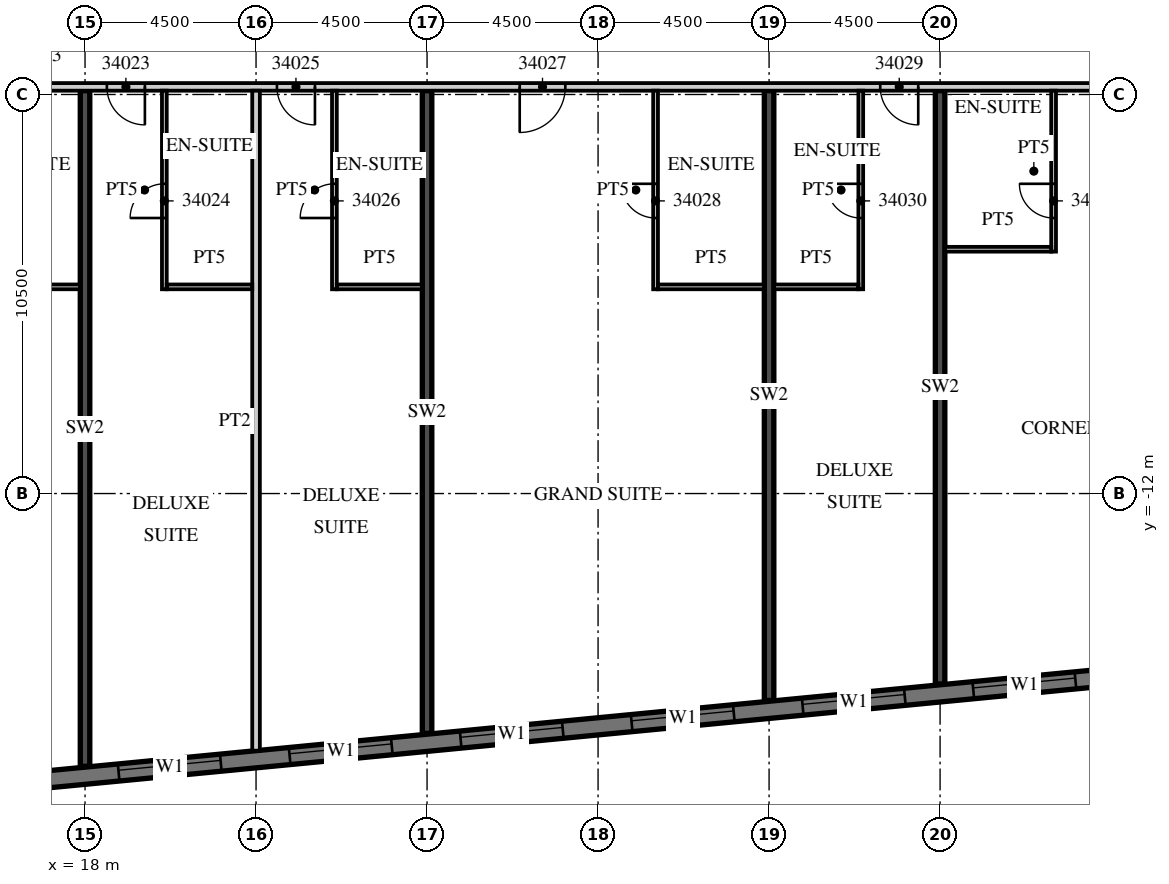
"""IFC4 building model, lengths in metres.
Left out: names, types, materials, properties, quantities, classifications, styles, units other than length and angle.
Written with IfcOpenShell. Run it as: python <this file> out.ifc"""

import sys

from ifc_helpers import new_model, si_unit, direction, frame, frame_2d, origin, place, context, subcontext, project, spatial, rectangle, extrude, element, fill, save


model = new_model("IFC4")
c1 = context("Model", 3, precision=1e-05, world=origin(), true_north=direction((0.0, 1.0)))
c2 = subcontext(c1, "Body", "Model", "MODEL_VIEW")
j1 = project(units=[si_unit("LENGTHUNIT", "METRE"), si_unit("PLANEANGLEUNIT", "RADIAN")], contexts=[c1])
p1 = place(None, origin())
s1 = spatial("IfcSite", under=j1, at=p1, CompositionType="ELEMENT")
p2 = place(p1, origin())
s2 = spatial("IfcBuilding", under=s1, at=p2, CompositionType="ELEMENT")
p3 = place(p2, frame((0.0, 0.0, 147.1)))
s3 = spatial("IfcBuildingStorey", under=s2, at=p3, CompositionType="ELEMENT", Elevation=147.1)
p4 = place(p3, frame((18.0, -19.177, 0.0), z_axis=(0.0, 0.0, 1.0), x_axis=(0.0, 1.0, 0.0)))
e1 = element("IfcWall", 1, at=p4, inside=s3, PredefinedType="SHEAR", context=c2, shape_type="SweptSolid", body=[
    extrude(rectangle(XDim=17.777, YDim=0.25, at=frame_2d((8.889, 0.0))), origin(), (0.0, 0.0, 1.0), 3.0),
])
p5 = place(p3, frame((27.0, -18.311, 0.0), z_axis=(0.0, 0.0, 1.0), x_axis=(0.0, 1.0, 0.0)))
e2 = element("IfcWall", 2, at=p5, inside=s3, PredefinedType="SHEAR", context=c2, shape_type="SweptSolid", body=[
    extrude(rectangle(XDim=16.911, YDim=0.25, at=frame_2d((8.455, 0.0))), origin(), (0.0, 0.0, 1.0), 3.0),
])
p6 = place(p3, frame((36.0, -17.444, 0.0), z_axis=(0.0, 0.0, 1.0), x_axis=(0.0, 1.0, 0.0)))
e3 = element("IfcWall", 3, at=p6, inside=s3, PredefinedType="SHEAR", context=c2, shape_type="SweptSolid", body=[
    extrude(rectangle(XDim=16.044, YDim=0.25, at=frame_2d((8.022, 0.0))), origin(), (0.0, 0.0, 1.0), 3.0),
])
p7 = place(p3, frame((40.5, -17.011, 0.0), z_axis=(0.0, 0.0, 1.0), x_axis=(0.0, 1.0, 0.0)))
e4 = element("IfcWall", 4, at=p7, inside=s3, PredefinedType="SHEAR", context=c2, shape_type="SweptSolid", body=[
    extrude(rectangle(XDim=15.611, YDim=0.25, at=frame_2d((7.805, 0.0))), origin(), (0.0, 0.0, 1.0), 3.0),
])
p8 = place(p3, frame((-13.521, -22.46, 0.0), z_axis=(0.0, 0.0, 1.0), x_axis=(0.995396096335, 0.095846812164, 0.0)))
e5 = element("IfcWall", 5, at=p8, inside=s3, PredefinedType="SOLIDWALL", context=c2, shape_type="SweptSolid", body=[
    extrude(rectangle(XDim=59.151, YDim=0.45, at=frame_2d((29.575, 0.0))), origin(), (0.0, 0.0, 1.0), 3.0),
])
p9 = place(p8, frame((0.91, 0.0, 0.45)))
e6 = element("IfcOpeningElement", 6, at=p9, cuts=e5, PredefinedType="OPENING", context=c2, shape_type="SweptSolid", body=[
    extrude(rectangle(XDim=2.7, YDim=2.25, at=frame_2d((1.35, 1.125))), frame((0.0, 0.235, 0.0), z_axis=(0.0, -1.0, 0.0), x_axis=(1.0, 0.0, 0.0)), (0.0, 0.0, 1.0), 0.47),
])
p10 = place(p8, frame((5.431, 0.0, 0.45)))
e7 = element("IfcOpeningElement", 7, at=p10, cuts=e5, PredefinedType="OPENING", context=c2, shape_type="SweptSolid", body=[
    extrude(rectangle(XDim=2.7, YDim=2.25, at=frame_2d((1.35, 1.125))), frame((0.0, 0.235, 0.0), z_axis=(0.0, -1.0, 0.0), x_axis=(1.0, 0.0, 0.0)), (0.0, 0.0, 1.0), 0.47),
])
p11 = place(p8, frame((9.952, 0.0, 0.45)))
e8 = element("IfcOpeningElement", 8, at=p11, cuts=e5, PredefinedType="OPENING", context=c2, shape_type="SweptSolid", body=[
    extrude(rectangle(XDim=2.7, YDim=2.25, at=frame_2d((1.35, 1.125))), frame((0.0, 0.235, 0.0), z_axis=(0.0, -1.0, 0.0), x_axis=(1.0, 0.0, 0.0)), (0.0, 0.0, 1.0), 0.47),
])
p12 = place(p8, frame((14.473, 0.0, 0.45)))
e9 = element("IfcOpeningElement", 9, at=p12, cuts=e5, PredefinedType="OPENING", context=c2, shape_type="SweptSolid", body=[
    extrude(rectangle(XDim=2.7, YDim=2.25, at=frame_2d((1.35, 1.125))), frame((0.0, 0.235, 0.0), z_axis=(0.0, -1.0, 0.0), x_axis=(1.0, 0.0, 0.0)), (0.0, 0.0, 1.0), 0.47),
])
p13 = place(p8, frame((18.994, 0.0, 0.45)))
e10 = element("IfcOpeningElement", 10, at=p13, cuts=e5, PredefinedType="OPENING", context=c2, shape_type="SweptSolid", body=[
    extrude(rectangle(XDim=2.7, YDim=2.25, at=frame_2d((1.35, 1.125))), frame((0.0, 0.235, 0.0), z_axis=(0.0, -1.0, 0.0), x_axis=(1.0, 0.0, 0.0)), (0.0, 0.0, 1.0), 0.47),
])
p14 = place(p8, frame((23.514, 0.0, 0.45)))
e11 = element("IfcOpeningElement", 11, at=p14, cuts=e5, PredefinedType="OPENING", context=c2, shape_type="SweptSolid", body=[
    extrude(rectangle(XDim=2.7, YDim=2.25, at=frame_2d((1.35, 1.125))), frame((0.0, 0.235, 0.0), z_axis=(0.0, -1.0, 0.0), x_axis=(1.0, 0.0, 0.0)), (0.0, 0.0, 1.0), 0.47),
])
p15 = place(p8, frame((28.035, 0.0, 0.45)))
e12 = element("IfcOpeningElement", 12, at=p15, cuts=e5, PredefinedType="OPENING", context=c2, shape_type="SweptSolid", body=[
    extrude(rectangle(XDim=2.7, YDim=2.25, at=frame_2d((1.35, 1.125))), frame((0.0, 0.235, 0.0), z_axis=(0.0, -1.0, 0.0), x_axis=(1.0, 0.0, 0.0)), (0.0, 0.0, 1.0), 0.47),
])
p16 = place(p8, frame((32.556, 0.0, 0.45)))
e13 = element("IfcOpeningElement", 13, at=p16, cuts=e5, PredefinedType="OPENING", context=c2, shape_type="SweptSolid", body=[
    extrude(rectangle(XDim=2.7, YDim=2.25, at=frame_2d((1.35, 1.125))), frame((0.0, 0.235, 0.0), z_axis=(0.0, -1.0, 0.0), x_axis=(1.0, 0.0, 0.0)), (0.0, 0.0, 1.0), 0.47),
])
p17 = place(p8, frame((37.077, 0.0, 0.45)))
e14 = element("IfcOpeningElement", 14, at=p17, cuts=e5, PredefinedType="OPENING", context=c2, shape_type="SweptSolid", body=[
    extrude(rectangle(XDim=2.7, YDim=2.25, at=frame_2d((1.35, 1.125))), frame((0.0, 0.235, 0.0), z_axis=(0.0, -1.0, 0.0), x_axis=(1.0, 0.0, 0.0)), (0.0, 0.0, 1.0), 0.47),
])
p18 = place(p8, frame((41.598, 0.0, 0.45)))
e15 = element("IfcOpeningElement", 15, at=p18, cuts=e5, PredefinedType="OPENING", context=c2, shape_type="SweptSolid", body=[
    extrude(rectangle(XDim=2.7, YDim=2.25, at=frame_2d((1.35, 1.125))), frame((0.0, 0.235, 0.0), z_axis=(0.0, -1.0, 0.0), x_axis=(1.0, 0.0, 0.0)), (0.0, 0.0, 1.0), 0.47),
])
p19 = place(p8, frame((46.118, 0.0, 0.45)))
e16 = element("IfcOpeningElement", 16, at=p19, cuts=e5, PredefinedType="OPENING", context=c2, shape_type="SweptSolid", body=[
    extrude(rectangle(XDim=2.7, YDim=2.25, at=frame_2d((1.35, 1.125))), frame((0.0, 0.235, 0.0), z_axis=(0.0, -1.0, 0.0), x_axis=(1.0, 0.0, 0.0)), (0.0, 0.0, 1.0), 0.47),
])
p20 = place(p8, frame((50.639, 0.0, 0.45)))
e17 = element("IfcOpeningElement", 17, at=p20, cuts=e5, PredefinedType="OPENING", context=c2, shape_type="SweptSolid", body=[
    extrude(rectangle(XDim=2.7, YDim=2.25, at=frame_2d((1.35, 1.125))), frame((0.0, 0.235, 0.0), z_axis=(0.0, -1.0, 0.0), x_axis=(1.0, 0.0, 0.0)), (0.0, 0.0, 1.0), 0.47),
])
p21 = place(p8, frame((55.15, 0.0, 0.45)))
e18 = element("IfcOpeningElement", 18, at=p21, cuts=e5, PredefinedType="OPENING", context=c2, shape_type="SweptSolid", body=[
    extrude(rectangle(XDim=2.7, YDim=2.25, at=frame_2d((1.35, 1.125))), frame((0.0, 0.235, 0.0), z_axis=(0.0, -1.0, 0.0), x_axis=(1.0, 0.0, 0.0)), (0.0, 0.0, 1.0), 0.47),
])
p22 = place(p3, frame((-13.5, -1.3, 0.0), z_axis=(0.0, 0.0, 1.0), x_axis=(1.0, 0.0, 0.0)))
e19 = element("IfcWall", 19, at=p22, inside=s3, PredefinedType="PARTITIONING", context=c2, shape_type="SweptSolid", body=[
    extrude(rectangle(XDim=60.932, YDim=0.2, at=frame_2d((30.466, 0.0))), origin(), (0.0, 0.0, 1.0), 3.0),
])
p23 = place(p22, frame((2.925, 0.0, 0.0)))
e20 = element("IfcOpeningElement", 20, at=p23, cuts=e19, PredefinedType="OPENING", context=c2, shape_type="SweptSolid", body=[
    extrude(rectangle(XDim=1.0, YDim=2.1, at=frame_2d((0.5, 1.05))), frame((0.0, 0.11, 0.0), z_axis=(0.0, -1.0, 0.0), x_axis=(1.0, 0.0, 0.0)), (0.0, 0.0, 1.0), 0.22),
])
p24 = place(p22, frame((6.938, 0.0, 0.0)))
e21 = element("IfcOpeningElement", 21, at=p24, cuts=e19, PredefinedType="OPENING", context=c2, shape_type="SweptSolid", body=[
    extrude(rectangle(XDim=1.2, YDim=2.1, at=frame_2d((0.6, 1.05))), frame((0.0, 0.11, 0.0), z_axis=(0.0, -1.0, 0.0), x_axis=(1.0, 0.0, 0.0)), (0.0, 0.0, 1.0), 0.22),
])
p25 = place(p22, frame((15.938, 0.0, 0.0)))
e22 = element("IfcOpeningElement", 22, at=p25, cuts=e19, PredefinedType="OPENING", context=c2, shape_type="SweptSolid", body=[
    extrude(rectangle(XDim=1.2, YDim=2.1, at=frame_2d((0.6, 1.05))), frame((0.0, 0.11, 0.0), z_axis=(0.0, -1.0, 0.0), x_axis=(1.0, 0.0, 0.0)), (0.0, 0.0, 1.0), 0.22),
])
p26 = place(p22, frame((24.938, 0.0, 0.0)))
e23 = element("IfcOpeningElement", 23, at=p26, cuts=e19, PredefinedType="OPENING", context=c2, shape_type="SweptSolid", body=[
    extrude(rectangle(XDim=1.2, YDim=2.1, at=frame_2d((0.6, 1.05))), frame((0.0, 0.11, 0.0), z_axis=(0.0, -1.0, 0.0), x_axis=(1.0, 0.0, 0.0)), (0.0, 0.0, 1.0), 0.22),
])
p27 = place(p22, frame((32.075, 0.0, 0.0)))
e24 = element("IfcOpeningElement", 24, at=p27, cuts=e19, PredefinedType="OPENING", context=c2, shape_type="SweptSolid", body=[
    extrude(rectangle(XDim=1.0, YDim=2.1, at=frame_2d((0.5, 1.05))), frame((0.0, 0.11, 0.0), z_axis=(0.0, -1.0, 0.0), x_axis=(1.0, 0.0, 0.0)), (0.0, 0.0, 1.0), 0.22),
])
p28 = place(p22, frame((36.55, 0.0, 0.0)))
e25 = element("IfcOpeningElement", 25, at=p28, cuts=e19, PredefinedType="OPENING", context=c2, shape_type="SweptSolid", body=[
    extrude(rectangle(XDim=1.0, YDim=2.1, at=frame_2d((0.5, 1.05))), frame((0.0, 0.11, 0.0), z_axis=(0.0, -1.0, 0.0), x_axis=(1.0, 0.0, 0.0)), (0.0, 0.0, 1.0), 0.22),
])
p29 = place(p22, frame((42.938, 0.0, 0.0)))
e26 = element("IfcOpeningElement", 26, at=p29, cuts=e19, PredefinedType="OPENING", context=c2, shape_type="SweptSolid", body=[
    extrude(rectangle(XDim=1.2, YDim=2.1, at=frame_2d((0.6, 1.05))), frame((0.0, 0.11, 0.0), z_axis=(0.0, -1.0, 0.0), x_axis=(1.0, 0.0, 0.0)), (0.0, 0.0, 1.0), 0.22),
])
p30 = place(p22, frame((52.425, 0.0, 0.0)))
e27 = element("IfcOpeningElement", 27, at=p30, cuts=e19, PredefinedType="OPENING", context=c2, shape_type="SweptSolid", body=[
    extrude(rectangle(XDim=1.0, YDim=2.1, at=frame_2d((0.5, 1.05))), frame((0.0, 0.11, 0.0), z_axis=(0.0, -1.0, 0.0), x_axis=(1.0, 0.0, 0.0)), (0.0, 0.0, 1.0), 0.22),
])
p31 = place(p22, frame((58.316, 0.0, 0.0)))
e28 = element("IfcOpeningElement", 28, at=p31, cuts=e19, PredefinedType="OPENING", context=c2, shape_type="SweptSolid", body=[
    extrude(rectangle(XDim=1.2, YDim=2.1, at=frame_2d((0.6, 1.05))), frame((0.0, 0.11, 0.0), z_axis=(0.0, -1.0, 0.0), x_axis=(1.0, 0.0, 0.0)), (0.0, 0.0, 1.0), 0.22),
])
p32 = place(p3, frame((15.075, -6.562, 0.0), z_axis=(0.0, 0.0, 1.0), x_axis=(1.0, 0.0, 0.0)))
e29 = element("IfcWall", 29, at=p32, inside=s3, PredefinedType="PARTITIONING", context=c2, shape_type="SweptSolid", body=[
    extrude(rectangle(XDim=2.8, YDim=0.125, at=frame_2d((1.4, 0.0))), origin(), (0.0, 0.0, 1.0), 3.0),
])
p33 = place(p3, frame((22.5, -18.766, 0.0), z_axis=(0.0, 0.0, 1.0), x_axis=(0.0, 1.0, 0.0)))
e30 = element("IfcWall", 30, at=p33, inside=s3, PredefinedType="PARTITIONING", context=c2, shape_type="SweptSolid", body=[
    extrude(rectangle(XDim=17.366, YDim=0.2, at=frame_2d((8.683, 0.0))), origin(), (0.0, 0.0, 1.0), 3.0),
])
p34 = place(p3, frame((20.087, -6.625, 0.0), z_axis=(0.0, 0.0, 1.0), x_axis=(0.0, 1.0, 0.0)))
e31 = element("IfcWall", 31, at=p34, inside=s3, PredefinedType="PARTITIONING", context=c2, shape_type="SweptSolid", body=[
    extrude(rectangle(XDim=5.225, YDim=0.125, at=frame_2d((2.613, 0.0))), origin(), (0.0, 0.0, 1.0), 3.0),
])
p35 = place(p34, frame((1.875, 0.0, 0.0)))
e32 = element("IfcOpeningElement", 32, at=p35, cuts=e31, PredefinedType="OPENING", context=c2, shape_type="SweptSolid", body=[
    extrude(rectangle(XDim=0.9, YDim=2.1, at=frame_2d((0.45, 1.05))), frame((0.0, 0.073, 0.0), z_axis=(0.0, -1.0, 0.0), x_axis=(1.0, 0.0, 0.0)), (0.0, 0.0, 1.0), 0.145),
])
p36 = place(p3, frame((20.15, -6.562, 0.0), z_axis=(0.0, 0.0, 1.0), x_axis=(1.0, 0.0, 0.0)))
e33 = element("IfcWall", 33, at=p36, inside=s3, PredefinedType="PARTITIONING", context=c2, shape_type="SweptSolid", body=[
    extrude(rectangle(XDim=2.25, YDim=0.125, at=frame_2d((1.125, 0.0))), origin(), (0.0, 0.0, 1.0), 3.0),
])
p37 = place(p3, frame((24.562, -6.625, 0.0), z_axis=(0.0, 0.0, 1.0), x_axis=(0.0, 1.0, 0.0)))
e34 = element("IfcWall", 34, at=p37, inside=s3, PredefinedType="PARTITIONING", context=c2, shape_type="SweptSolid", body=[
    extrude(rectangle(XDim=5.225, YDim=0.125, at=frame_2d((2.613, 0.0))), origin(), (0.0, 0.0, 1.0), 3.0),
])
p38 = place(p37, frame((1.875, 0.0, 0.0)))
e35 = element("IfcOpeningElement", 35, at=p38, cuts=e34, PredefinedType="OPENING", context=c2, shape_type="SweptSolid", body=[
    extrude(rectangle(XDim=0.9, YDim=2.1, at=frame_2d((0.45, 1.05))), frame((0.0, 0.073, 0.0), z_axis=(0.0, -1.0, 0.0), x_axis=(1.0, 0.0, 0.0)), (0.0, 0.0, 1.0), 0.145),
])
p39 = place(p3, frame((24.625, -6.562, 0.0), z_axis=(0.0, 0.0, 1.0), x_axis=(1.0, 0.0, 0.0)))
e36 = element("IfcWall", 36, at=p39, inside=s3, PredefinedType="PARTITIONING", context=c2, shape_type="SweptSolid", body=[
    extrude(rectangle(XDim=2.25, YDim=0.125, at=frame_2d((1.125, 0.0))), origin(), (0.0, 0.0, 1.0), 3.0),
])
p40 = place(p3, frame((33.013, -6.625, 0.0), z_axis=(0.0, 0.0, 1.0), x_axis=(0.0, 1.0, 0.0)))
e37 = element("IfcWall", 37, at=p40, inside=s3, PredefinedType="PARTITIONING", context=c2, shape_type="SweptSolid", body=[
    extrude(rectangle(XDim=5.225, YDim=0.125, at=frame_2d((2.613, 0.0))), origin(), (0.0, 0.0, 1.0), 3.0),
])
p41 = place(p40, frame((1.875, 0.0, 0.0)))
e38 = element("IfcOpeningElement", 38, at=p41, cuts=e37, PredefinedType="OPENING", context=c2, shape_type="SweptSolid", body=[
    extrude(rectangle(XDim=0.9, YDim=2.1, at=frame_2d((0.45, 1.05))), frame((0.0, 0.073, 0.0), z_axis=(0.0, -1.0, 0.0), x_axis=(1.0, 0.0, 0.0)), (0.0, 0.0, 1.0), 0.145),
])
p42 = place(p3, frame((33.075, -6.562, 0.0), z_axis=(0.0, 0.0, 1.0), x_axis=(1.0, 0.0, 0.0)))
e39 = element("IfcWall", 39, at=p42, inside=s3, PredefinedType="PARTITIONING", context=c2, shape_type="SweptSolid", body=[
    extrude(rectangle(XDim=2.8, YDim=0.125, at=frame_2d((1.4, 0.0))), origin(), (0.0, 0.0, 1.0), 3.0),
])
p43 = place(p3, frame((38.413, -6.625, 0.0), z_axis=(0.0, 0.0, 1.0), x_axis=(0.0, 1.0, 0.0)))
e40 = element("IfcWall", 40, at=p43, inside=s3, PredefinedType="PARTITIONING", context=c2, shape_type="SweptSolid", body=[
    extrude(rectangle(XDim=5.225, YDim=0.125, at=frame_2d((2.613, 0.0))), origin(), (0.0, 0.0, 1.0), 3.0),
])
p44 = place(p43, frame((1.875, 0.0, 0.0)))
e41 = element("IfcOpeningElement", 41, at=p44, cuts=e40, PredefinedType="OPENING", context=c2, shape_type="SweptSolid", body=[
    extrude(rectangle(XDim=0.9, YDim=2.1, at=frame_2d((0.45, 1.05))), frame((0.0, 0.073, 0.0), z_axis=(0.0, -1.0, 0.0), x_axis=(1.0, 0.0, 0.0)), (0.0, 0.0, 1.0), 0.145),
])
p45 = place(p3, frame((36.125, -6.562, 0.0), z_axis=(0.0, 0.0, 1.0), x_axis=(1.0, 0.0, 0.0)))
e42 = element("IfcWall", 42, at=p45, inside=s3, PredefinedType="PARTITIONING", context=c2, shape_type="SweptSolid", body=[
    extrude(rectangle(XDim=2.225, YDim=0.125, at=frame_2d((1.113, 0.0))), origin(), (0.0, 0.0, 1.0), 3.0),
])
p46 = place(p3, frame((43.487, -5.634, 0.0), z_axis=(0.0, 0.0, 1.0), x_axis=(0.0, 1.0, 0.0)))
e43 = element("IfcWall", 43, at=p46, inside=s3, PredefinedType="PARTITIONING", context=c2, shape_type="SweptSolid", body=[
    extrude(rectangle(XDim=4.234, YDim=0.125, at=frame_2d((2.117, 0.0))), origin(), (0.0, 0.0, 1.0), 3.0),
])
p47 = place(p46, frame((0.884, 0.0, 0.0)))
e44 = element("IfcOpeningElement", 44, at=p47, cuts=e43, PredefinedType="OPENING", context=c2, shape_type="SweptSolid", body=[
    extrude(rectangle(XDim=0.9, YDim=2.1, at=frame_2d((0.45, 1.05))), frame((0.0, 0.073, 0.0), z_axis=(0.0, -1.0, 0.0), x_axis=(1.0, 0.0, 0.0)), (0.0, 0.0, 1.0), 0.145),
])
p48 = place(p3, frame((40.625, -5.572, 0.0), z_axis=(0.0, 0.0, 1.0), x_axis=(1.0, 0.0, 0.0)))
e45 = element("IfcWall", 45, at=p48, inside=s3, PredefinedType="PARTITIONING", context=c2, shape_type="SweptSolid", body=[
    extrude(rectangle(XDim=2.8, YDim=0.125, at=frame_2d((1.4, 0.0))), origin(), (0.0, 0.0, 1.0), 3.0),
])
p49 = place(p16, origin())
e46 = element("IfcWindow", 46, at=p49, inside=s3, PartitioningType="SINGLE_PANEL", PredefinedType="WINDOW", context=c2, shape_type="SweptSolid", body=[
    extrude(rectangle(XDim=2.7, YDim=2.25, at=frame_2d((1.35, 1.125))), frame((0.0, 0.09, 0.0), z_axis=(0.0, -1.0, 0.0), x_axis=(1.0, 0.0, 0.0)), (0.0, 0.0, 1.0), 0.06),
])
fill(e13, e46)
p50 = place(p17, origin())
e47 = element("IfcWindow", 47, at=p50, inside=s3, PartitioningType="SINGLE_PANEL", PredefinedType="WINDOW", context=c2, shape_type="SweptSolid", body=[
    extrude(rectangle(XDim=2.7, YDim=2.25, at=frame_2d((1.35, 1.125))), frame((0.0, 0.09, 0.0), z_axis=(0.0, -1.0, 0.0), x_axis=(1.0, 0.0, 0.0)), (0.0, 0.0, 1.0), 0.06),
])
fill(e14, e47)
p51 = place(p18, origin())
e48 = element("IfcWindow", 48, at=p51, inside=s3, PartitioningType="SINGLE_PANEL", PredefinedType="WINDOW", context=c2, shape_type="SweptSolid", body=[
    extrude(rectangle(XDim=2.7, YDim=2.25, at=frame_2d((1.35, 1.125))), frame((0.0, 0.09, 0.0), z_axis=(0.0, -1.0, 0.0), x_axis=(1.0, 0.0, 0.0)), (0.0, 0.0, 1.0), 0.06),
])
fill(e15, e48)
p52 = place(p19, origin())
e49 = element("IfcWindow", 49, at=p52, inside=s3, PartitioningType="SINGLE_PANEL", PredefinedType="WINDOW", context=c2, shape_type="SweptSolid", body=[
    extrude(rectangle(XDim=2.7, YDim=2.25, at=frame_2d((1.35, 1.125))), frame((0.0, 0.09, 0.0), z_axis=(0.0, -1.0, 0.0), x_axis=(1.0, 0.0, 0.0)), (0.0, 0.0, 1.0), 0.06),
])
fill(e16, e49)
p53 = place(p20, origin())
e50 = element("IfcWindow", 50, at=p53, inside=s3, PartitioningType="SINGLE_PANEL", PredefinedType="WINDOW", context=c2, shape_type="SweptSolid", body=[
    extrude(rectangle(XDim=2.7, YDim=2.25, at=frame_2d((1.35, 1.125))), frame((0.0, 0.09, 0.0), z_axis=(0.0, -1.0, 0.0), x_axis=(1.0, 0.0, 0.0)), (0.0, 0.0, 1.0), 0.06),
])
fill(e17, e50)
p54 = place(p21, origin())
e51 = element("IfcWindow", 51, at=p54, inside=s3, PartitioningType="SINGLE_PANEL", PredefinedType="WINDOW", context=c2, shape_type="SweptSolid", body=[
    extrude(rectangle(XDim=2.7, YDim=2.25, at=frame_2d((1.35, 1.125))), frame((0.0, 0.09, 0.0), z_axis=(0.0, -1.0, 0.0), x_axis=(1.0, 0.0, 0.0)), (0.0, 0.0, 1.0), 0.06),
])
fill(e18, e51)
p55 = place(p27, origin())
e52 = element("IfcDoor", 52, at=p55, inside=s3, OperationType="SINGLE_SWING_RIGHT", PredefinedType="DOOR", context=c2, shape_type="SweptSolid", body=[
    extrude(rectangle(XDim=1.0, YDim=2.1, at=frame_2d((0.5, 1.05))), frame((0.0, 0.025, 0.0), z_axis=(0.0, -1.0, 0.0), x_axis=(1.0, 0.0, 0.0)), (0.0, 0.0, 1.0), 0.05),
])
fill(e24, e52)
p56 = place(p35, origin())
e53 = element("IfcDoor", 53, at=p56, inside=s3, OperationType="SINGLE_SWING_LEFT", PredefinedType="DOOR", context=c2, shape_type="SweptSolid", body=[
    extrude(rectangle(XDim=0.9, YDim=2.1, at=frame_2d((0.45, 1.05))), frame((0.0, 0.025, 0.0), z_axis=(0.0, -1.0, 0.0), x_axis=(1.0, 0.0, 0.0)), (0.0, 0.0, 1.0), 0.05),
])
fill(e32, e53)
p57 = place(p28, origin())
e54 = element("IfcDoor", 54, at=p57, inside=s3, OperationType="SINGLE_SWING_RIGHT", PredefinedType="DOOR", context=c2, shape_type="SweptSolid", body=[
    extrude(rectangle(XDim=1.0, YDim=2.1, at=frame_2d((0.5, 1.05))), frame((0.0, 0.025, 0.0), z_axis=(0.0, -1.0, 0.0), x_axis=(1.0, 0.0, 0.0)), (0.0, 0.0, 1.0), 0.05),
])
fill(e25, e54)
p58 = place(p38, origin())
e55 = element("IfcDoor", 55, at=p58, inside=s3, OperationType="SINGLE_SWING_LEFT", PredefinedType="DOOR", context=c2, shape_type="SweptSolid", body=[
    extrude(rectangle(XDim=0.9, YDim=2.1, at=frame_2d((0.45, 1.05))), frame((0.0, 0.025, 0.0), z_axis=(0.0, -1.0, 0.0), x_axis=(1.0, 0.0, 0.0)), (0.0, 0.0, 1.0), 0.05),
])
fill(e35, e55)
p59 = place(p29, origin())
e56 = element("IfcDoor", 56, at=p59, inside=s3, OperationType="SINGLE_SWING_LEFT", PredefinedType="DOOR", context=c2, shape_type="SweptSolid", body=[
    extrude(rectangle(XDim=1.2, YDim=2.1, at=frame_2d((0.6, 1.05))), frame((0.0, 0.025, 0.0), z_axis=(0.0, -1.0, 0.0), x_axis=(1.0, 0.0, 0.0)), (0.0, 0.0, 1.0), 0.05),
])
fill(e26, e56)
p60 = place(p41, origin())
e57 = element("IfcDoor", 57, at=p60, inside=s3, OperationType="SINGLE_SWING_RIGHT", PredefinedType="DOOR", context=c2, shape_type="SweptSolid", body=[
    extrude(rectangle(XDim=0.9, YDim=2.1, at=frame_2d((0.45, 1.05))), frame((0.0, 0.025, 0.0), z_axis=(0.0, -1.0, 0.0), x_axis=(1.0, 0.0, 0.0)), (0.0, 0.0, 1.0), 0.05),
])
fill(e38, e57)
p61 = place(p30, origin())
e58 = element("IfcDoor", 58, at=p61, inside=s3, OperationType="SINGLE_SWING_RIGHT", PredefinedType="DOOR", context=c2, shape_type="SweptSolid", body=[
    extrude(rectangle(XDim=1.0, YDim=2.1, at=frame_2d((0.5, 1.05))), frame((0.0, 0.025, 0.0), z_axis=(0.0, -1.0, 0.0), x_axis=(1.0, 0.0, 0.0)), (0.0, 0.0, 1.0), 0.05),
])
fill(e27, e58)
p62 = place(p44, origin())
e59 = element("IfcDoor", 59, at=p62, inside=s3, OperationType="SINGLE_SWING_RIGHT", PredefinedType="DOOR", context=c2, shape_type="SweptSolid", body=[
    extrude(rectangle(XDim=0.9, YDim=2.1, at=frame_2d((0.45, 1.05))), frame((0.0, 0.025, 0.0), z_axis=(0.0, -1.0, 0.0), x_axis=(1.0, 0.0, 0.0)), (0.0, 0.0, 1.0), 0.05),
])
fill(e41, e59)
p63 = place(p47, origin())
e60 = element("IfcDoor", 60, at=p63, inside=s3, OperationType="SINGLE_SWING_RIGHT", PredefinedType="DOOR", context=c2, shape_type="SweptSolid", body=[
    extrude(rectangle(XDim=0.9, YDim=2.1, at=frame_2d((0.45, 1.05))), frame((0.0, 0.025, 0.0), z_axis=(0.0, -1.0, 0.0), x_axis=(1.0, 0.0, 0.0)), (0.0, 0.0, 1.0), 0.05),
])
fill(e44, e60)
save(model, sys.argv[1])
